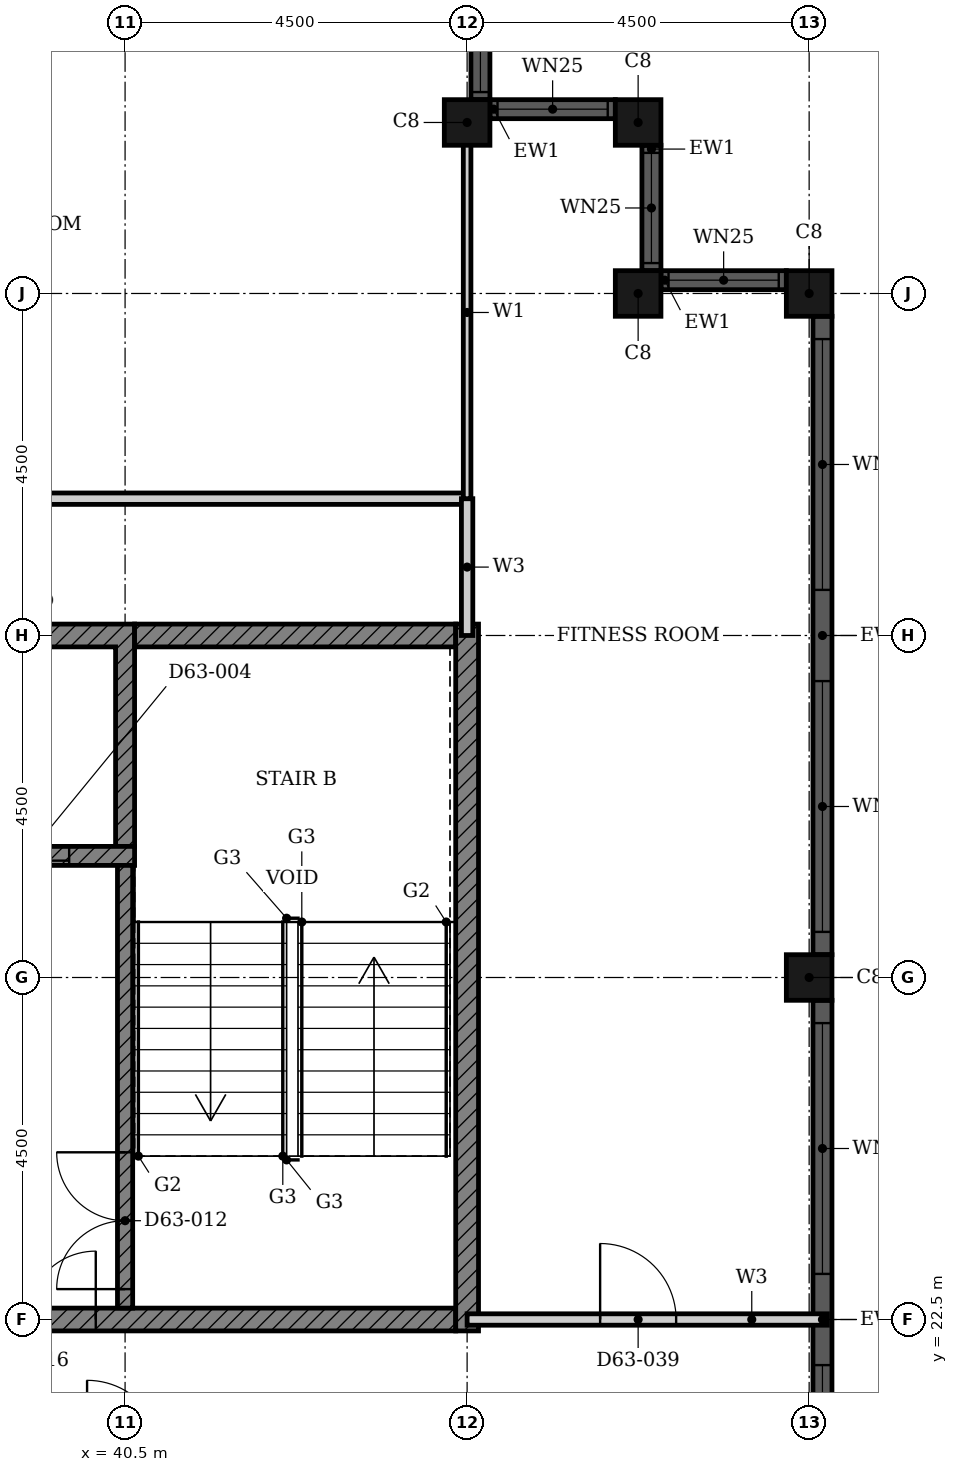
"""IFC4 building model, lengths in metres.
Left out: names, types, materials, properties, quantities, classifications, styles, units other than length and angle.
Written with IfcOpenShell. Run it as: python <this file> out.ifc"""

import sys

from ifc_helpers import new_model, si_unit, direction, frame, frame_2d, origin, origin_2d, place, context, subcontext, project, spatial, polyline, rectangle, hollow_rectangle, outline, extrude, element, fill, save


model = new_model("IFC4")
c1 = context("Model", 3, precision=1e-05, world=origin(), true_north=direction((0.0, 1.0)))
c2 = subcontext(c1, "Body", "Model", "MODEL_VIEW")
j1 = project(units=[si_unit("LENGTHUNIT", "METRE"), si_unit("PLANEANGLEUNIT", "RADIAN")], contexts=[c1])
p1 = place(None, origin())
s1 = spatial("IfcSite", under=j1, at=p1, CompositionType="ELEMENT")
p2 = place(p1, origin())
s2 = spatial("IfcBuilding", under=s1, at=p2, CompositionType="ELEMENT")
p3 = place(p2, frame((0.0, 0.0, 249.0)))
s3 = spatial("IfcBuildingStorey", under=s2, at=p3, CompositionType="ELEMENT", Elevation=249.0)
for number, where, z_axis, x_axis in (
    (1, (49.5, 27.0, 0.0), (0.0, 0.0, 1.0), (1.0, 0.0, 0.0)),
    (2, (49.5, 36.0, 0.0), (0.0, 0.0, 1.0), (1.0, 0.0, 0.0)),
    (3, (47.25, 36.0, 0.0), (0.0, 0.0, 1.0), (1.0, 0.0, 0.0)),
    (4, (47.25, 38.25, 0.0), (0.0, 0.0, 1.0), (1.0, 0.0, 0.0)),
    (5, (45.0, 38.25, 0.0), (0.0, 0.0, 1.0), (1.0, 0.0, 0.0)),
):
    element("IfcColumn", number, at=place(p3, frame(where, z_axis=z_axis, x_axis=x_axis)), inside=s3, PredefinedType="COLUMN", context=c2, shape_type="SweptSolid", body=[
        extrude(hollow_rectangle(XDim=0.6, YDim=0.6, WallThickness=0.02, at=origin_2d()), origin(), (0.0, 0.0, 1.0), 3.7),
    ])
p4 = place(p3, frame((49.675, 18.3, 0.0), z_axis=(0.0, 0.0, 1.0), x_axis=(0.0, 1.0, 0.0)))
e6 = element("IfcWall", 6, at=p4, inside=s3, PredefinedType="SOLIDWALL", context=c2, shape_type="SweptSolid", body=[
    extrude(rectangle(XDim=8.4, YDim=0.25, at=frame_2d((4.2, 0.0))), origin(), (0.0, 0.0, 1.0), 3.7),
])
p5 = place(p4, frame((0.3, 0.0, 0.45)))
e7 = element("IfcOpeningElement", 7, at=p5, cuts=e6, PredefinedType="OPENING", context=c2, shape_type="SweptSolid", body=[
    extrude(rectangle(XDim=3.3, YDim=2.3, at=frame_2d((1.65, 1.15))), frame((0.0, 0.135, 0.0), z_axis=(0.0, -1.0, 0.0), x_axis=(1.0, 0.0, 0.0)), (0.0, 0.0, 1.0), 0.27),
])
p6 = place(p4, frame((4.8, 0.0, 0.45)))
e8 = element("IfcOpeningElement", 8, at=p6, cuts=e6, PredefinedType="OPENING", context=c2, shape_type="SweptSolid", body=[
    extrude(rectangle(XDim=3.3, YDim=2.3, at=frame_2d((1.65, 1.15))), frame((0.0, 0.135, 0.0), z_axis=(0.0, -1.0, 0.0), x_axis=(1.0, 0.0, 0.0)), (0.0, 0.0, 1.0), 0.27),
])
p7 = place(p3, frame((49.675, 27.3, 0.0), z_axis=(0.0, 0.0, 1.0), x_axis=(0.0, 1.0, 0.0)))
e9 = element("IfcWall", 9, at=p7, inside=s3, PredefinedType="SOLIDWALL", context=c2, shape_type="SweptSolid", body=[
    extrude(rectangle(XDim=8.4, YDim=0.25, at=frame_2d((4.2, 0.0))), origin(), (0.0, 0.0, 1.0), 3.7),
])
p8 = place(p7, frame((0.3, 0.0, 0.45)))
e10 = element("IfcOpeningElement", 10, at=p8, cuts=e9, PredefinedType="OPENING", context=c2, shape_type="SweptSolid", body=[
    extrude(rectangle(XDim=3.3, YDim=2.3, at=frame_2d((1.65, 1.15))), frame((0.0, 0.135, 0.0), z_axis=(0.0, -1.0, 0.0), x_axis=(1.0, 0.0, 0.0)), (0.0, 0.0, 1.0), 0.27),
])
p9 = place(p7, frame((4.8, 0.0, 0.45)))
e11 = element("IfcOpeningElement", 11, at=p9, cuts=e9, PredefinedType="OPENING", context=c2, shape_type="SweptSolid", body=[
    extrude(rectangle(XDim=3.3, YDim=2.3, at=frame_2d((1.65, 1.15))), frame((0.0, 0.135, 0.0), z_axis=(0.0, -1.0, 0.0), x_axis=(1.0, 0.0, 0.0)), (0.0, 0.0, 1.0), 0.27),
])
p10 = place(p3, frame((49.2, 36.175, 0.0), z_axis=(0.0, 0.0, 1.0), x_axis=(-1.0, 0.0, 0.0)))
e12 = element("IfcWall", 12, at=p10, inside=s3, PredefinedType="SOLIDWALL", context=c2, shape_type="SweptSolid", body=[
    extrude(rectangle(XDim=1.65, YDim=0.25, at=frame_2d((0.825, 0.0))), origin(), (0.0, 0.0, 1.0), 3.7),
])
p11 = place(p10, frame((0.1, 0.0, 0.9)))
e13 = element("IfcOpeningElement", 13, at=p11, cuts=e12, PredefinedType="OPENING", context=c2, shape_type="SweptSolid", body=[
    extrude(rectangle(XDim=1.45, YDim=1.85, at=frame_2d((0.725, 0.925))), frame((0.0, 0.135, 0.0), z_axis=(0.0, -1.0, 0.0), x_axis=(1.0, 0.0, 0.0)), (0.0, 0.0, 1.0), 0.27),
])
p12 = place(p3, frame((47.425, 36.3, 0.0), z_axis=(0.0, 0.0, 1.0), x_axis=(0.0, 1.0, 0.0)))
e14 = element("IfcWall", 14, at=p12, inside=s3, PredefinedType="SOLIDWALL", context=c2, shape_type="SweptSolid", body=[
    extrude(rectangle(XDim=1.65, YDim=0.25, at=frame_2d((0.825, 0.0))), origin(), (0.0, 0.0, 1.0), 3.7),
])
p13 = place(p12, frame((0.1, 0.0, 0.9)))
e15 = element("IfcOpeningElement", 15, at=p13, cuts=e14, PredefinedType="OPENING", context=c2, shape_type="SweptSolid", body=[
    extrude(rectangle(XDim=1.45, YDim=1.85, at=frame_2d((0.725, 0.925))), frame((0.0, 0.135, 0.0), z_axis=(0.0, -1.0, 0.0), x_axis=(1.0, 0.0, 0.0)), (0.0, 0.0, 1.0), 0.27),
])
p14 = place(p3, frame((46.95, 38.425, 0.0), z_axis=(0.0, 0.0, 1.0), x_axis=(-1.0, 0.0, 0.0)))
e16 = element("IfcWall", 16, at=p14, inside=s3, PredefinedType="SOLIDWALL", context=c2, shape_type="SweptSolid", body=[
    extrude(rectangle(XDim=1.65, YDim=0.25, at=frame_2d((0.825, 0.0))), origin(), (0.0, 0.0, 1.0), 3.7),
])
p15 = place(p14, frame((0.1, 0.0, 0.9)))
e17 = element("IfcOpeningElement", 17, at=p15, cuts=e16, PredefinedType="OPENING", context=c2, shape_type="SweptSolid", body=[
    extrude(rectangle(XDim=1.45, YDim=1.85, at=frame_2d((0.725, 0.925))), frame((0.0, 0.135, 0.0), z_axis=(0.0, -1.0, 0.0), x_axis=(1.0, 0.0, 0.0)), (0.0, 0.0, 1.0), 0.27),
])
p16 = place(p3, frame((45.175, 38.55, 0.0), z_axis=(0.0, 0.0, 1.0), x_axis=(0.0, 1.0, 0.0)))
e18 = element("IfcWall", 18, at=p16, inside=s3, PredefinedType="SOLIDWALL", context=c2, shape_type="SweptSolid", body=[
    extrude(rectangle(XDim=1.65, YDim=0.25, at=frame_2d((0.825, 0.0))), origin(), (0.0, 0.0, 1.0), 3.7),
])
p17 = place(p16, frame((0.1, 0.0, 0.9)))
e19 = element("IfcOpeningElement", 19, at=p17, cuts=e18, PredefinedType="OPENING", context=c2, shape_type="SweptSolid", body=[
    extrude(rectangle(XDim=1.45, YDim=1.85, at=frame_2d((0.725, 0.925))), frame((0.0, 0.135, 0.0), z_axis=(0.0, -1.0, 0.0), x_axis=(1.0, 0.0, 0.0)), (0.0, 0.0, 1.0), 0.27),
])
p18 = place(p3, origin())
e20 = element("IfcWall", 20, at=p18, inside=s3, PredefinedType="SHEAR", context=c2, shape_type="SweptSolid", body=[
    extrude(outline(polyline([(37.803, 28.725), (38.053, 28.725), (38.053, 31.35), (40.375, 31.35), (40.375, 28.725), (40.625, 28.725), (40.625, 31.65), (37.803, 31.65), (37.803, 28.725)])), origin(), (0.0, 0.0, 1.0), 3.4),
])
p19 = place(p3, frame((30.339, 22.5, 0.0), z_axis=(0.0, 0.0, 1.0), x_axis=(1.0, 0.0, 0.0)))
e21 = element("IfcWall", 21, at=p19, inside=s3, PredefinedType="SHEAR", context=c2, shape_type="SweptSolid", body=[
    extrude(rectangle(XDim=14.511, YDim=0.3, at=frame_2d((7.255, 0.0))), origin(), (0.0, 0.0, 1.0), 3.4),
])
p20 = place(p19, frame((7.975, 0.0, 0.0)))
e22 = element("IfcOpeningElement", 22, at=p20, cuts=e21, PredefinedType="OPENING", context=c2, shape_type="SweptSolid", body=[
    extrude(rectangle(XDim=1.8, YDim=2.1, at=frame_2d((0.9, 1.05))), frame((0.0, 0.16, 0.0), z_axis=(0.0, -1.0, 0.0), x_axis=(1.0, 0.0, 0.0)), (0.0, 0.0, 1.0), 0.32),
])
p21 = place(p3, frame((40.625, 31.5, 0.0), z_axis=(0.0, 0.0, 1.0), x_axis=(1.0, 0.0, 0.0)))
e23 = element("IfcWall", 23, at=p21, inside=s3, PredefinedType="SHEAR", context=c2, shape_type="SweptSolid", body=[
    extrude(rectangle(XDim=4.225, YDim=0.3, at=frame_2d((2.113, 0.0))), origin(), (0.0, 0.0, 1.0), 3.4),
])
p22 = place(p3, frame((45.0, 22.35, 0.0), z_axis=(0.0, 0.0, 1.0), x_axis=(0.0, 1.0, 0.0)))
e24 = element("IfcWall", 24, at=p22, inside=s3, PredefinedType="SHEAR", context=c2, shape_type="SweptSolid", body=[
    extrude(rectangle(XDim=9.3, YDim=0.3, at=frame_2d((4.65, 0.0))), origin(), (0.0, 0.0, 1.0), 3.4),
])
p23 = place(p3, frame((24.947, 28.6, 0.0), z_axis=(0.0, 0.0, 1.0), x_axis=(1.0, 0.0, 0.0)))
e25 = element("IfcWall", 25, at=p23, inside=s3, PredefinedType="SHEAR", context=c2, shape_type="SweptSolid", body=[
    extrude(rectangle(XDim=15.678, YDim=0.25, at=frame_2d((7.839, 0.0))), origin(), (0.0, 0.0, 1.0), 3.4),
])
p24 = place(p23, frame((3.432, 0.0, 0.0)))
e26 = element("IfcOpeningElement", 26, at=p24, cuts=e25, PredefinedType="OPENING", context=c2, shape_type="SweptSolid", body=[
    extrude(rectangle(XDim=1.1, YDim=2.1, at=frame_2d((0.55, 1.05))), frame((0.0, 0.135, 0.0), z_axis=(0.0, -1.0, 0.0), x_axis=(1.0, 0.0, 0.0)), (0.0, 0.0, 1.0), 0.27),
])
p25 = place(p23, frame((13.718, 0.0, 0.0)))
e27 = element("IfcOpeningElement", 27, at=p25, cuts=e25, PredefinedType="OPENING", context=c2, shape_type="SweptSolid", body=[
    extrude(rectangle(XDim=1.1, YDim=2.1, at=frame_2d((0.55, 1.05))), frame((0.0, 0.135, 0.0), z_axis=(0.0, -1.0, 0.0), x_axis=(1.0, 0.0, 0.0)), (0.0, 0.0, 1.0), 0.27),
])
p26 = place(p23, frame((0.961, 0.0, 0.0)))
e28 = element("IfcOpeningElement", 28, at=p26, cuts=e25, PredefinedType="OPENING", context=c2, shape_type="SweptSolid", body=[
    extrude(rectangle(XDim=0.9, YDim=2.1, at=frame_2d((0.45, 1.05))), frame((0.0, 0.135, 0.0), z_axis=(0.0, -1.0, 0.0), x_axis=(1.0, 0.0, 0.0)), (0.0, 0.0, 1.0), 0.27),
])
p27 = place(p23, frame((7.389, 0.0, 0.0)))
e29 = element("IfcOpeningElement", 29, at=p27, cuts=e25, PredefinedType="OPENING", context=c2, shape_type="SweptSolid", body=[
    extrude(rectangle(XDim=0.9, YDim=2.1, at=frame_2d((0.45, 1.05))), frame((0.0, 0.135, 0.0), z_axis=(0.0, -1.0, 0.0), x_axis=(1.0, 0.0, 0.0)), (0.0, 0.0, 1.0), 0.27),
])
p28 = place(p23, frame((11.246, 0.0, 0.0)))
e30 = element("IfcOpeningElement", 30, at=p28, cuts=e25, PredefinedType="OPENING", context=c2, shape_type="SweptSolid", body=[
    extrude(rectangle(XDim=0.9, YDim=2.1, at=frame_2d((0.45, 1.05))), frame((0.0, 0.135, 0.0), z_axis=(0.0, -1.0, 0.0), x_axis=(1.0, 0.0, 0.0)), (0.0, 0.0, 1.0), 0.27),
])
p29 = place(p3, frame((40.5, 22.65, 0.0), z_axis=(0.0, 0.0, 1.0), x_axis=(0.0, 1.0, 0.0)))
e31 = element("IfcWall", 31, at=p29, inside=s3, PredefinedType="SHEAR", context=c2, shape_type="SweptSolid", body=[
    extrude(rectangle(XDim=5.825, YDim=0.2, at=frame_2d((2.913, 0.0))), origin(), (0.0, 0.0, 1.0), 3.4),
])
p30 = place(p29, frame((0.25, 0.0, 0.0)))
e32 = element("IfcOpeningElement", 32, at=p30, cuts=e31, PredefinedType="OPENING", context=c2, shape_type="SweptSolid", body=[
    extrude(rectangle(XDim=1.8, YDim=2.1, at=frame_2d((0.9, 1.05))), frame((0.0, 0.11, 0.0), z_axis=(0.0, -1.0, 0.0), x_axis=(1.0, 0.0, 0.0)), (0.0, 0.0, 1.0), 0.22),
])
p31 = place(p3, frame((45.0, 22.5, 0.0), z_axis=(0.0, 0.0, 1.0), x_axis=(1.0, 0.0, 0.0)))
e33 = element("IfcWall", 33, at=p31, inside=s3, PredefinedType="PARTITIONING", context=c2, shape_type="SweptSolid", body=[
    extrude(rectangle(XDim=4.74, YDim=0.15, at=frame_2d((2.37, 0.0))), origin(), (0.0, 0.0, 1.0), 3.4),
])
p32 = place(p31, frame((1.75, 0.0, 0.0)))
e34 = element("IfcOpeningElement", 34, at=p32, cuts=e33, PredefinedType="OPENING", context=c2, shape_type="SweptSolid", body=[
    extrude(rectangle(XDim=1.0, YDim=2.1, at=frame_2d((0.5, 1.05))), frame((0.0, 0.085, 0.0), z_axis=(0.0, -1.0, 0.0), x_axis=(1.0, 0.0, 0.0)), (0.0, 0.0, 1.0), 0.17),
])
p33 = place(p3, frame((20.4, 33.3, 0.0), z_axis=(0.0, 0.0, 1.0), x_axis=(1.0, 0.0, 0.0)))
e35 = element("IfcWall", 35, at=p33, inside=s3, PredefinedType="PARTITIONING", context=c2, shape_type="SweptSolid", body=[
    extrude(rectangle(XDim=24.6, YDim=0.15, at=frame_2d((12.3, 0.0))), origin(), (0.0, 0.0, 1.0), 3.4),
])
p34 = place(p33, frame((1.6, 0.0, 0.0)))
e36 = element("IfcOpeningElement", 36, at=p34, cuts=e35, PredefinedType="OPENING", context=c2, shape_type="SweptSolid", body=[
    extrude(rectangle(XDim=1.0, YDim=2.2, at=frame_2d((0.5, 1.1))), frame((0.0, 0.085, 0.0), z_axis=(0.0, -1.0, 0.0), x_axis=(1.0, 0.0, 0.0)), (0.0, 0.0, 1.0), 0.17),
])
p35 = place(p33, frame((17.35, 0.0, 0.0)))
e37 = element("IfcOpeningElement", 37, at=p35, cuts=e35, PredefinedType="OPENING", context=c2, shape_type="SweptSolid", body=[
    extrude(rectangle(XDim=1.0, YDim=2.1, at=frame_2d((0.5, 1.05))), frame((0.0, 0.085, 0.0), z_axis=(0.0, -1.0, 0.0), x_axis=(1.0, 0.0, 0.0)), (0.0, 0.0, 1.0), 0.17),
])
p36 = place(p3, frame((45.0, 31.5, 0.0), z_axis=(0.0, 0.0, 1.0), x_axis=(0.0, 1.0, 0.0)))
e38 = element("IfcWall", 38, at=p36, inside=s3, PredefinedType="PARTITIONING", context=c2, shape_type="SweptSolid", body=[
    extrude(rectangle(XDim=1.8, YDim=0.15, at=frame_2d((0.9, 0.0))), origin(), (0.0, 0.0, 1.0), 3.4),
])
p37 = place(p3, frame((45.0, 33.3, 0.0), z_axis=(0.0, 0.0, 1.0), x_axis=(0.0, 1.0, 0.0)))
e39 = element("IfcWall", 39, at=p37, inside=s3, PredefinedType="PARTITIONING", context=c2, shape_type="SweptSolid", body=[
    extrude(rectangle(XDim=4.9, YDim=0.1, at=frame_2d((2.45, 0.0))), origin(), (0.0, 0.0, 1.0), 3.4),
])
p38 = place(p5, origin())
e40 = element("IfcWindow", 40, at=p38, inside=s3, PartitioningType="SINGLE_PANEL", PredefinedType="WINDOW", context=c2, shape_type="SweptSolid", body=[
    extrude(rectangle(XDim=3.3, YDim=2.3, at=frame_2d((1.65, 1.15))), frame((0.0, 0.03, 0.0), z_axis=(0.0, -1.0, 0.0), x_axis=(1.0, 0.0, 0.0)), (0.0, 0.0, 1.0), 0.06),
])
fill(e7, e40)
p39 = place(p6, origin())
e41 = element("IfcWindow", 41, at=p39, inside=s3, PartitioningType="SINGLE_PANEL", PredefinedType="WINDOW", context=c2, shape_type="SweptSolid", body=[
    extrude(rectangle(XDim=3.3, YDim=2.3, at=frame_2d((1.65, 1.15))), frame((0.0, 0.03, 0.0), z_axis=(0.0, -1.0, 0.0), x_axis=(1.0, 0.0, 0.0)), (0.0, 0.0, 1.0), 0.06),
])
fill(e8, e41)
p40 = place(p8, origin())
e42 = element("IfcWindow", 42, at=p40, inside=s3, PartitioningType="SINGLE_PANEL", PredefinedType="WINDOW", context=c2, shape_type="SweptSolid", body=[
    extrude(rectangle(XDim=3.3, YDim=2.3, at=frame_2d((1.65, 1.15))), frame((0.0, 0.03, 0.0), z_axis=(0.0, -1.0, 0.0), x_axis=(1.0, 0.0, 0.0)), (0.0, 0.0, 1.0), 0.06),
])
fill(e10, e42)
p41 = place(p9, origin())
e43 = element("IfcWindow", 43, at=p41, inside=s3, PartitioningType="SINGLE_PANEL", PredefinedType="WINDOW", context=c2, shape_type="SweptSolid", body=[
    extrude(rectangle(XDim=3.3, YDim=2.3, at=frame_2d((1.65, 1.15))), frame((0.0, 0.03, 0.0), z_axis=(0.0, -1.0, 0.0), x_axis=(1.0, 0.0, 0.0)), (0.0, 0.0, 1.0), 0.06),
])
fill(e11, e43)
p42 = place(p11, origin())
e44 = element("IfcWindow", 44, at=p42, inside=s3, PartitioningType="SINGLE_PANEL", PredefinedType="WINDOW", context=c2, shape_type="SweptSolid", body=[
    extrude(rectangle(XDim=1.45, YDim=1.85, at=frame_2d((0.725, 0.925))), frame((0.0, 0.03, 0.0), z_axis=(0.0, -1.0, 0.0), x_axis=(1.0, 0.0, 0.0)), (0.0, 0.0, 1.0), 0.06),
])
fill(e13, e44)
p43 = place(p13, origin())
e45 = element("IfcWindow", 45, at=p43, inside=s3, PartitioningType="SINGLE_PANEL", PredefinedType="WINDOW", context=c2, shape_type="SweptSolid", body=[
    extrude(rectangle(XDim=1.45, YDim=1.85, at=frame_2d((0.725, 0.925))), frame((0.0, 0.03, 0.0), z_axis=(0.0, -1.0, 0.0), x_axis=(1.0, 0.0, 0.0)), (0.0, 0.0, 1.0), 0.06),
])
fill(e15, e45)
p44 = place(p15, origin())
e46 = element("IfcWindow", 46, at=p44, inside=s3, PartitioningType="SINGLE_PANEL", PredefinedType="WINDOW", context=c2, shape_type="SweptSolid", body=[
    extrude(rectangle(XDim=1.45, YDim=1.85, at=frame_2d((0.725, 0.925))), frame((0.0, 0.03, 0.0), z_axis=(0.0, -1.0, 0.0), x_axis=(1.0, 0.0, 0.0)), (0.0, 0.0, 1.0), 0.06),
])
fill(e17, e46)
p45 = place(p17, origin())
e47 = element("IfcWindow", 47, at=p45, inside=s3, PartitioningType="SINGLE_PANEL", PredefinedType="WINDOW", context=c2, shape_type="SweptSolid", body=[
    extrude(rectangle(XDim=1.45, YDim=1.85, at=frame_2d((0.725, 0.925))), frame((0.0, 0.03, 0.0), z_axis=(0.0, -1.0, 0.0), x_axis=(1.0, 0.0, 0.0)), (0.0, 0.0, 1.0), 0.06),
])
fill(e19, e47)
p46 = place(p25, origin())
e48 = element("IfcDoor", 48, at=p46, inside=s3, OperationType="DOUBLE_DOOR_SLIDING", PredefinedType="DOOR", context=c2, shape_type="SweptSolid", body=[
    extrude(rectangle(XDim=1.1, YDim=2.1, at=frame_2d((0.55, 1.05))), frame((0.0, 0.025, 0.0), z_axis=(0.0, -1.0, 0.0), x_axis=(1.0, 0.0, 0.0)), (0.0, 0.0, 1.0), 0.05),
])
fill(e27, e48)
p47 = place(p30, origin())
e49 = element("IfcDoor", 49, at=p47, inside=s3, OperationType="DOUBLE_DOOR_SINGLE_SWING", PredefinedType="DOOR", context=c2, shape_type="SweptSolid", body=[
    extrude(rectangle(XDim=1.8, YDim=2.1, at=frame_2d((0.9, 1.05))), frame((0.0, 0.025, 0.0), z_axis=(0.0, -1.0, 0.0), x_axis=(1.0, 0.0, 0.0)), (0.0, 0.0, 1.0), 0.05),
])
fill(e32, e49)
p48 = place(p20, origin())
e50 = element("IfcDoor", 50, at=p48, inside=s3, OperationType="DOUBLE_DOOR_SINGLE_SWING", PredefinedType="DOOR", context=c2, shape_type="SweptSolid", body=[
    extrude(rectangle(XDim=1.8, YDim=2.1, at=frame_2d((0.9, 1.05))), frame((0.0, 0.025, 0.0), z_axis=(0.0, -1.0, 0.0), x_axis=(1.0, 0.0, 0.0)), (0.0, 0.0, 1.0), 0.05),
])
fill(e22, e50)
p49 = place(p32, origin())
e51 = element("IfcDoor", 51, at=p49, inside=s3, OperationType="SINGLE_SWING_LEFT", PredefinedType="DOOR", context=c2, shape_type="SweptSolid", body=[
    extrude(rectangle(XDim=1.0, YDim=2.1, at=frame_2d((0.5, 1.05))), frame((0.0, 0.025, 0.0), z_axis=(0.0, -1.0, 0.0), x_axis=(1.0, 0.0, 0.0)), (0.0, 0.0, 1.0), 0.05),
])
fill(e34, e51)
save(model, sys.argv[1])
